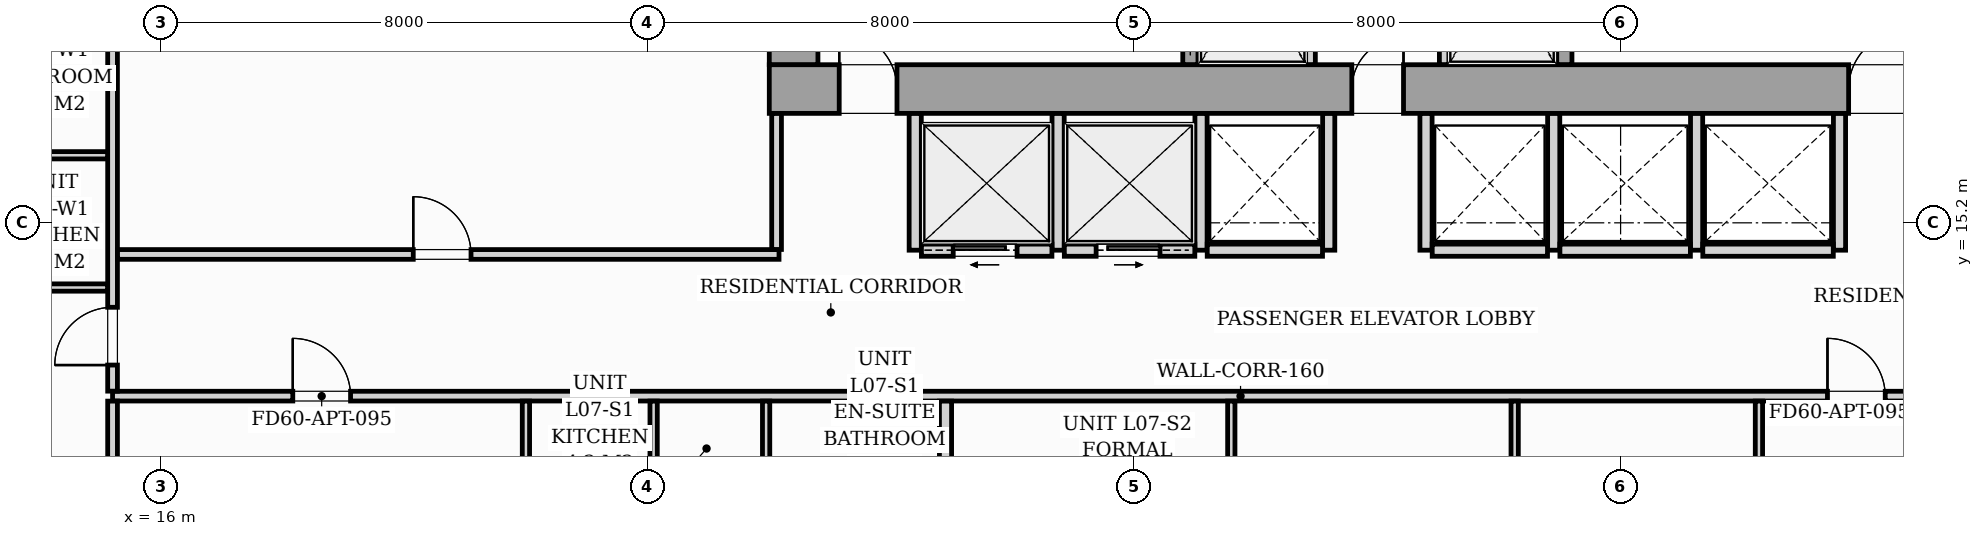
"""IFC4 building model, lengths in metres.
Left out: names, types, materials, properties, quantities, classifications, styles, units other than length and angle.
Written with IfcOpenShell. Run it as: python <this file> out.ifc"""

import sys

from ifc_helpers import new_model, si_unit, direction, frame, frame_2d, origin, origin_2d, place, context, subcontext, project, spatial, rectangle, i_section, extrude, source, transform, mapped, element, fill, save


model = new_model("IFC4")
c1 = context("Model", 3, precision=1e-05, world=origin(), true_north=direction((0.0, 1.0)))
c2 = subcontext(c1, "Body", "Model", "MODEL_VIEW")
j1 = project(units=[si_unit("LENGTHUNIT", "METRE"), si_unit("PLANEANGLEUNIT", "RADIAN")], contexts=[c1])
p1 = place(None, origin())
s1 = spatial("IfcSite", under=j1, at=p1, CompositionType="ELEMENT")
p2 = place(p1, origin())
s2 = spatial("IfcBuilding", under=s1, at=p2, CompositionType="ELEMENT")
p3 = place(p2, frame((0.0, 0.0, 29.4)))
s3 = spatial("IfcBuildingStorey", under=s2, at=p3, CompositionType="ELEMENT", Elevation=29.4)
m1 = source(origin(), c2, "Body", "SweptSolid", [
    extrude(i_section(OverallWidth=0.437, OverallDepth=0.514, WebThickness=0.061, FlangeThickness=0.097, FilletRadius=0.018, at=origin_2d()), origin(), (0.0, 0.0, 1.0), 3.196),
])
for number, where, z_axis, x_axis in (
    (1, (26.4, 17.4, 0.002), (0.0, 0.0, 1.0), (1.0, 0.0, 0.0)),
    (2, (33.12, 17.4, 0.002), (0.0, 0.0, 1.0), (1.0, 0.0, 0.0)),
    (3, (38.88, 17.4, 0.002), (0.0, 0.0, 1.0), (1.0, 0.0, 0.0)),
):
    element("IfcColumn", number, at=place(p3, frame(where, z_axis=z_axis, x_axis=x_axis)), inside=s3, PredefinedType="PILASTER", context=c2, shape_type="MappedRepresentation", body=[
        mapped(m1, transform((0.0, 0.0, 0.0), scale=1.0)),
    ])
p4 = place(p3, frame((26.0, 17.4, 0.0), z_axis=(0.0, 0.0, 1.0), x_axis=(1.0, 0.0, 0.0)))
e4 = element("IfcWall", 4, at=p4, inside=s3, PredefinedType="SHEAR", context=c2, shape_type="SweptSolid", body=[
    extrude(rectangle(XDim=20.0, YDim=0.8, at=frame_2d((10.0, 0.0))), origin(), (0.0, 0.0, 1.0), 3.2),
])
p5 = place(p4, frame((1.15, 0.0, 0.0)))
e5 = element("IfcOpeningElement", 5, at=p5, cuts=e4, PredefinedType="OPENING", context=c2, shape_type="SweptSolid", body=[
    extrude(rectangle(XDim=0.95, YDim=2.06, at=frame_2d((0.475, 1.03))), frame((0.0, 0.41, 0.0), z_axis=(0.0, -1.0, 0.0), x_axis=(1.0, 0.0, 0.0)), (0.0, 0.0, 1.0), 0.82),
])
p6 = place(p4, frame((9.58, 0.0, 0.0)))
e6 = element("IfcOpeningElement", 6, at=p6, cuts=e4, PredefinedType="OPENING", context=c2, shape_type="SweptSolid", body=[
    extrude(rectangle(XDim=0.85, YDim=2.0, at=frame_2d((0.425, 1.0))), frame((0.0, 0.41, 0.0), z_axis=(0.0, -1.0, 0.0), x_axis=(1.0, 0.0, 0.0)), (0.0, 0.0, 1.0), 0.82),
])
p7 = place(p4, frame((17.75, 0.0, 0.0)))
e7 = element("IfcOpeningElement", 7, at=p7, cuts=e4, PredefinedType="OPENING", context=c2, shape_type="SweptSolid", body=[
    extrude(rectangle(XDim=0.95, YDim=2.06, at=frame_2d((0.475, 1.03))), frame((0.0, 0.41, 0.0), z_axis=(0.0, -1.0, 0.0), x_axis=(1.0, 0.0, 0.0)), (0.0, 0.0, 1.0), 0.82),
])
p8 = place(p3, frame((26.4, 17.802, 0.0), z_axis=(0.0, 0.0, 1.0), x_axis=(0.0, 1.0, 0.0)))
e8 = element("IfcWall", 8, at=p8, inside=s3, PredefinedType="SHEAR", context=c2, shape_type="SweptSolid", body=[
    extrude(rectangle(XDim=5.796, YDim=0.8, at=frame_2d((2.898, 0.0))), origin(), (0.0, 0.0, 1.0), 3.2),
])
p9 = place(p3, frame((32.925, 17.802, 0.0), z_axis=(0.0, 0.0, 1.0), x_axis=(0.0, 1.0, 0.0)))
e9 = element("IfcWall", 9, at=p9, inside=s3, PredefinedType="SOLIDWALL", context=c2, shape_type="SweptSolid", body=[
    extrude(rectangle(XDim=2.646, YDim=0.25, at=frame_2d((1.323, 0.0))), origin(), (0.0, 0.0, 1.0), 3.2),
])
p10 = place(p9, frame((0.648, 0.0, 0.0)))
e10 = element("IfcOpeningElement", 10, at=p10, cuts=e9, PredefinedType="OPENING", context=c2, shape_type="SweptSolid", body=[
    extrude(rectangle(XDim=1.1, YDim=2.08, at=frame_2d((0.55, 1.04))), frame((0.0, 0.135, 0.0), z_axis=(0.0, -1.0, 0.0), x_axis=(1.0, 0.0, 0.0)), (0.0, 0.0, 1.0), 0.27),
])
for number, where, z_axis, x_axis in (
    (11, (34.9, 17.802, 0.0), (0.0, 0.0, 1.0), (0.0, 1.0, 0.0)),
    (12, (37.1, 17.802, 0.0), (0.0, 0.0, 1.0), (0.0, 1.0, 0.0)),
):
    element("IfcWall", number, at=place(p3, frame(where, z_axis=z_axis, x_axis=x_axis)), inside=s3, PredefinedType="PARTITIONING", context=c2, shape_type="SweptSolid", body=[
        extrude(rectangle(XDim=2.646, YDim=0.16, at=frame_2d((1.323, 0.0))), origin(), (0.0, 0.0, 1.0), 2.94),
    ])
p11 = place(p3, frame((39.075, 17.802, 0.0), z_axis=(0.0, 0.0, 1.0), x_axis=(0.0, 1.0, 0.0)))
e13 = element("IfcWall", 13, at=p11, inside=s3, PredefinedType="SOLIDWALL", context=c2, shape_type="SweptSolid", body=[
    extrude(rectangle(XDim=2.646, YDim=0.25, at=frame_2d((1.323, 0.0))), origin(), (0.0, 0.0, 1.0), 3.2),
])
p12 = place(p11, frame((0.648, 0.0, 0.0)))
e14 = element("IfcOpeningElement", 14, at=p12, cuts=e13, PredefinedType="OPENING", context=c2, shape_type="SweptSolid", body=[
    extrude(rectangle(XDim=1.1, YDim=2.08, at=frame_2d((0.55, 1.04))), frame((0.0, 0.135, 0.0), z_axis=(0.0, -1.0, 0.0), x_axis=(1.0, 0.0, 0.0)), (0.0, 0.0, 1.0), 0.27),
])
for number, where, z_axis, x_axis in (
    (15, (28.4, 14.75, 0.0), (0.0, 0.0, 1.0), (0.0, 1.0, 0.0)),
    (16, (30.75, 14.75, 0.0), (0.0, 0.0, 1.0), (0.0, 1.0, 0.0)),
    (17, (33.1, 14.75, 0.0), (0.0, 0.0, 1.0), (0.0, 1.0, 0.0)),
):
    element("IfcWall", number, at=place(p3, frame(where, z_axis=z_axis, x_axis=x_axis)), inside=s3, PredefinedType="PARTITIONING", context=c2, shape_type="SweptSolid", body=[
        extrude(rectangle(XDim=2.248, YDim=0.2, at=frame_2d((1.124, 0.0))), origin(), (0.0, 0.0, 1.0), 2.94),
    ])
p13 = place(p3, frame((28.502, 14.75, 0.0), z_axis=(0.0, 0.0, 1.0), x_axis=(1.0, 0.0, 0.0)))
e18 = element("IfcWall", 18, at=p13, inside=s3, PredefinedType="PARTITIONING", context=c2, shape_type="SweptSolid", body=[
    extrude(rectangle(XDim=2.146, YDim=0.2, at=frame_2d((1.073, 0.0))), origin(), (0.0, 0.0, 1.0), 2.94),
])
p14 = place(p13, frame((0.523, 0.0, 0.0)))
e19 = element("IfcOpeningElement", 19, at=p14, cuts=e18, PredefinedType="OPENING", context=c2, shape_type="SweptSolid", body=[
    extrude(rectangle(XDim=1.05, YDim=2.08, at=frame_2d((0.525, 1.04))), frame((0.0, 0.11, 0.0), z_axis=(0.0, -1.0, 0.0), x_axis=(1.0, 0.0, 0.0)), (0.0, 0.0, 1.0), 0.22),
])
p15 = place(p3, frame((30.852, 14.75, 0.0), z_axis=(0.0, 0.0, 1.0), x_axis=(1.0, 0.0, 0.0)))
e20 = element("IfcWall", 20, at=p15, inside=s3, PredefinedType="PARTITIONING", context=c2, shape_type="SweptSolid", body=[
    extrude(rectangle(XDim=2.146, YDim=0.2, at=frame_2d((1.073, 0.0))), origin(), (0.0, 0.0, 1.0), 2.94),
])
p16 = place(p15, frame((0.523, 0.0, 0.0)))
e21 = element("IfcOpeningElement", 21, at=p16, cuts=e20, PredefinedType="OPENING", context=c2, shape_type="SweptSolid", body=[
    extrude(rectangle(XDim=1.05, YDim=2.08, at=frame_2d((0.525, 1.04))), frame((0.0, 0.11, 0.0), z_axis=(0.0, -1.0, 0.0), x_axis=(1.0, 0.0, 0.0)), (0.0, 0.0, 1.0), 0.22),
])
p17 = place(p3, frame((35.2, 14.75, 0.0), z_axis=(0.0, 0.0, 1.0), x_axis=(0.0, 1.0, 0.0)))
e22 = element("IfcWall", 22, at=p17, inside=s3, PredefinedType="PARTITIONING", context=c2, shape_type="SweptSolid", body=[
    extrude(rectangle(XDim=2.248, YDim=0.2, at=frame_2d((1.124, 0.0))), origin(), (0.0, 0.0, 1.0), 2.94),
])
p18 = place(p3, frame((33.202, 14.75, 0.0), z_axis=(0.0, 0.0, 1.0), x_axis=(1.0, 0.0, 0.0)))
e23 = element("IfcWall", 23, at=p18, inside=s3, PredefinedType="PARTITIONING", context=c2, shape_type="SweptSolid", body=[
    extrude(rectangle(XDim=1.896, YDim=0.2, at=frame_2d((0.948, 0.0))), origin(), (0.0, 0.0, 1.0), 2.94),
])
for number, where, z_axis, x_axis in (
    (24, (36.8, 14.75, 0.0), (0.0, 0.0, 1.0), (0.0, 1.0, 0.0)),
    (25, (38.9, 14.75, 0.0), (0.0, 0.0, 1.0), (0.0, 1.0, 0.0)),
):
    element("IfcWall", number, at=place(p3, frame(where, z_axis=z_axis, x_axis=x_axis)), inside=s3, PredefinedType="PARTITIONING", context=c2, shape_type="SweptSolid", body=[
        extrude(rectangle(XDim=2.248, YDim=0.2, at=frame_2d((1.124, 0.0))), origin(), (0.0, 0.0, 1.0), 2.94),
    ])
p19 = place(p3, frame((36.902, 14.75, 0.0), z_axis=(0.0, 0.0, 1.0), x_axis=(1.0, 0.0, 0.0)))
e26 = element("IfcWall", 26, at=p19, inside=s3, PredefinedType="PARTITIONING", context=c2, shape_type="SweptSolid", body=[
    extrude(rectangle(XDim=1.896, YDim=0.2, at=frame_2d((0.948, 0.0))), origin(), (0.0, 0.0, 1.0), 2.94),
])
for number, where, z_axis, x_axis in (
    (27, (41.25, 14.75, 0.0), (0.0, 0.0, 1.0), (0.0, 1.0, 0.0)),
    (28, (43.6, 14.75, 0.0), (0.0, 0.0, 1.0), (0.0, 1.0, 0.0)),
):
    element("IfcWall", number, at=place(p3, frame(where, z_axis=z_axis, x_axis=x_axis)), inside=s3, PredefinedType="PARTITIONING", context=c2, shape_type="SweptSolid", body=[
        extrude(rectangle(XDim=2.248, YDim=0.2, at=frame_2d((1.124, 0.0))), origin(), (0.0, 0.0, 1.0), 2.94),
    ])
for number, where, z_axis, x_axis in (
    (29, (39.002, 14.75, 0.0), (0.0, 0.0, 1.0), (1.0, 0.0, 0.0)),
    (30, (41.352, 14.75, 0.0), (0.0, 0.0, 1.0), (1.0, 0.0, 0.0)),
):
    element("IfcWall", number, at=place(p3, frame(where, z_axis=z_axis, x_axis=x_axis)), inside=s3, PredefinedType="PARTITIONING", context=c2, shape_type="SweptSolid", body=[
        extrude(rectangle(XDim=2.146, YDim=0.2, at=frame_2d((1.073, 0.0))), origin(), (0.0, 0.0, 1.0), 2.94),
    ])
p20 = place(p3, frame((15.2, 12.35, 0.0), z_axis=(0.0, 0.0, 1.0), x_axis=(1.0, 0.0, 0.0)))
e31 = element("IfcWall", 31, at=p20, inside=s3, PredefinedType="PARTITIONING", context=c2, shape_type="SweptSolid", body=[
    extrude(rectangle(XDim=37.1, YDim=0.16, at=frame_2d((18.55, 0.0))), origin(), (0.0, 0.0, 1.0), 2.94),
])
p21 = place(p20, frame((2.964, 0.0, 0.0)))
e32 = element("IfcOpeningElement", 32, at=p21, cuts=e31, PredefinedType="OPENING", context=c2, shape_type="SweptSolid", body=[
    extrude(rectangle(XDim=0.95, YDim=2.06, at=frame_2d((0.475, 1.03))), frame((0.0, 0.09, 0.0), z_axis=(0.0, -1.0, 0.0), x_axis=(1.0, 0.0, 0.0)), (0.0, 0.0, 1.0), 0.18),
])
p22 = place(p20, frame((28.202, 0.0, 0.0)))
e33 = element("IfcOpeningElement", 33, at=p22, cuts=e31, PredefinedType="OPENING", context=c2, shape_type="SweptSolid", body=[
    extrude(rectangle(XDim=0.95, YDim=2.06, at=frame_2d((0.475, 1.03))), frame((0.0, 0.09, 0.0), z_axis=(0.0, -1.0, 0.0), x_axis=(1.0, 0.0, 0.0)), (0.0, 0.0, 1.0), 0.18),
])
p23 = place(p3, frame((15.2, 2.962, 0.0), z_axis=(0.0, 0.0, 1.0), x_axis=(0.0, 1.0, 0.0)))
e34 = element("IfcWall", 34, at=p23, inside=s3, PredefinedType="PARTITIONING", context=c2, shape_type="SweptSolid", body=[
    extrude(rectangle(XDim=9.306, YDim=0.16, at=frame_2d((4.653, 0.0))), origin(), (0.0, 0.0, 1.0), 2.94),
])
p24 = place(p3, frame((15.2, 12.432, 0.0), z_axis=(0.0, 0.0, 1.0), x_axis=(0.0, 1.0, 0.0)))
e35 = element("IfcWall", 35, at=p24, inside=s3, PredefinedType="PARTITIONING", context=c2, shape_type="SweptSolid", body=[
    extrude(rectangle(XDim=15.006, YDim=0.16, at=frame_2d((7.503, 0.0))), origin(), (0.0, 0.0, 1.0), 2.94),
])
p25 = place(p24, frame((0.429, 0.0, 0.0)))
e36 = element("IfcOpeningElement", 36, at=p25, cuts=e35, PredefinedType="OPENING", context=c2, shape_type="SweptSolid", body=[
    extrude(rectangle(XDim=0.95, YDim=2.06, at=frame_2d((0.475, 1.03))), frame((0.0, 0.09, 0.0), z_axis=(0.0, -1.0, 0.0), x_axis=(1.0, 0.0, 0.0)), (0.0, 0.0, 1.0), 0.18),
])
p26 = place(p3, frame((25.948, 2.78, 0.0), z_axis=(0.0, 0.0, 1.0), x_axis=(0.0, 1.0, 0.0)))
e37 = element("IfcWall", 37, at=p26, inside=s3, PredefinedType="PARTITIONING", context=c2, shape_type="SweptSolid", body=[
    extrude(rectangle(XDim=9.488, YDim=0.12, at=frame_2d((4.744, 0.0))), origin(), (0.0, 0.0, 1.0), 2.94),
])
p27 = place(p26, frame((6.22, 0.0, 0.0)))
e38 = element("IfcOpeningElement", 38, at=p27, cuts=e37, PredefinedType="OPENING", context=c2, shape_type="SweptSolid", body=[
    extrude(rectangle(XDim=0.9, YDim=2.05, at=frame_2d((0.45, 1.025))), frame((0.0, 0.07, 0.0), z_axis=(0.0, -1.0, 0.0), x_axis=(1.0, 0.0, 0.0)), (0.0, 0.0, 1.0), 0.14),
])
for number, where, z_axis, x_axis in (
    (39, (24.098, 10.162, 0.0), (0.0, 0.0, 1.0), (0.0, 1.0, 0.0)),
    (40, (21.998, 10.162, 0.0), (0.0, 0.0, 1.0), (0.0, 1.0, 0.0)),
):
    element("IfcWall", number, at=place(p3, frame(where, z_axis=z_axis, x_axis=x_axis)), inside=s3, PredefinedType="PARTITIONING", context=c2, shape_type="SweptSolid", body=[
        extrude(rectangle(XDim=2.106, YDim=0.12, at=frame_2d((1.053, 0.0))), origin(), (0.0, 0.0, 1.0), 2.94),
    ])
p28 = place(p3, frame((28.898, 10.112, 0.0), z_axis=(0.0, 0.0, 1.0), x_axis=(0.0, 1.0, 0.0)))
e41 = element("IfcWall", 41, at=p28, inside=s3, PredefinedType="PARTITIONING", context=c2, shape_type="SweptSolid", body=[
    extrude(rectangle(XDim=2.156, YDim=0.2, at=frame_2d((1.078, 0.0))), origin(), (0.0, 0.0, 1.0), 2.94),
])
p29 = place(p3, frame((33.598, 2.78, 0.0), z_axis=(0.0, 0.0, 1.0), x_axis=(0.0, 1.0, 0.0)))
e42 = element("IfcWall", 42, at=p29, inside=s3, PredefinedType="PARTITIONING", context=c2, shape_type="SweptSolid", body=[
    extrude(rectangle(XDim=9.488, YDim=0.12, at=frame_2d((4.744, 0.0))), origin(), (0.0, 0.0, 1.0), 2.94),
])
p30 = place(p29, frame((4.4, 0.0, 0.0)))
e43 = element("IfcOpeningElement", 43, at=p30, cuts=e42, PredefinedType="OPENING", context=c2, shape_type="SweptSolid", body=[
    extrude(rectangle(XDim=0.85, YDim=2.05, at=frame_2d((0.425, 1.025))), frame((0.0, 0.07, 0.0), z_axis=(0.0, -1.0, 0.0), x_axis=(1.0, 0.0, 0.0)), (0.0, 0.0, 1.0), 0.14),
])
p31 = place(p3, frame((38.258, 2.78, 0.0), z_axis=(0.0, 0.0, 1.0), x_axis=(0.0, 1.0, 0.0)))
e44 = element("IfcWall", 44, at=p31, inside=s3, PredefinedType="PARTITIONING", context=c2, shape_type="SweptSolid", body=[
    extrude(rectangle(XDim=9.488, YDim=0.12, at=frame_2d((4.744, 0.0))), origin(), (0.0, 0.0, 1.0), 2.94),
])
p32 = place(p31, frame((4.4, 0.0, 0.0)))
e45 = element("IfcOpeningElement", 45, at=p32, cuts=e44, PredefinedType="OPENING", context=c2, shape_type="SweptSolid", body=[
    extrude(rectangle(XDim=0.85, YDim=2.05, at=frame_2d((0.425, 1.025))), frame((0.0, 0.07, 0.0), z_axis=(0.0, -1.0, 0.0), x_axis=(1.0, 0.0, 0.0)), (0.0, 0.0, 1.0), 0.14),
])
p33 = place(p3, frame((42.275, 2.962, 0.0), z_axis=(0.0, 0.0, 1.0), x_axis=(0.0, 1.0, 0.0)))
e46 = element("IfcWall", 46, at=p33, inside=s3, PredefinedType="PARTITIONING", context=c2, shape_type="SweptSolid", body=[
    extrude(rectangle(XDim=9.306, YDim=0.12, at=frame_2d((4.653, 0.0))), origin(), (0.0, 0.0, 1.0), 2.94),
])
p34 = place(p33, frame((4.218, 0.0, 0.0)))
e47 = element("IfcOpeningElement", 47, at=p34, cuts=e46, PredefinedType="OPENING", context=c2, shape_type="SweptSolid", body=[
    extrude(rectangle(XDim=0.85, YDim=2.05, at=frame_2d((0.425, 1.025))), frame((0.0, 0.07, 0.0), z_axis=(0.0, -1.0, 0.0), x_axis=(1.0, 0.0, 0.0)), (0.0, 0.0, 1.0), 0.14),
])
p35 = place(p3, frame((12.862, 16.311, 0.0), z_axis=(0.0, 0.0, 1.0), x_axis=(1.0, 0.0, 0.0)))
e48 = element("IfcWall", 48, at=p35, inside=s3, PredefinedType="PARTITIONING", context=c2, shape_type="SweptSolid", body=[
    extrude(rectangle(XDim=2.256, YDim=0.12, at=frame_2d((1.128, 0.0))), origin(), (0.0, 0.0, 1.0), 2.045),
])
p36 = place(p3, frame((12.862, 14.136, 0.0), z_axis=(0.0, 0.0, 1.0), x_axis=(1.0, 0.0, 0.0)))
e49 = element("IfcWall", 49, at=p36, inside=s3, PredefinedType="PARTITIONING", context=c2, shape_type="SweptSolid", body=[
    extrude(rectangle(XDim=2.256, YDim=0.12, at=frame_2d((1.128, 0.0))), origin(), (0.0, 0.0, 1.0), 2.94),
])
p37 = place(p3, frame((15.282, 14.68, 0.0), z_axis=(0.0, 0.0, 1.0), x_axis=(1.0, 0.0, 0.0)))
e50 = element("IfcWall", 50, at=p37, inside=s3, PredefinedType="PARTITIONING", context=c2, shape_type="SweptSolid", body=[
    extrude(rectangle(XDim=10.878, YDim=0.16, at=frame_2d((5.439, 0.0))), origin(), (0.0, 0.0, 1.0), 2.94),
])
p38 = place(p37, frame((4.863, 0.0, 0.0)))
e51 = element("IfcOpeningElement", 51, at=p38, cuts=e50, PredefinedType="OPENING", context=c2, shape_type="SweptSolid", body=[
    extrude(rectangle(XDim=0.95, YDim=2.06, at=frame_2d((0.475, 1.03))), frame((0.0, 0.09, 0.0), z_axis=(0.0, -1.0, 0.0), x_axis=(1.0, 0.0, 0.0)), (0.0, 0.0, 1.0), 0.18),
])
p39 = place(p3, frame((26.12, 14.762, 0.0), z_axis=(0.0, 0.0, 1.0), x_axis=(0.0, 1.0, 0.0)))
e52 = element("IfcWall", 52, at=p39, inside=s3, PredefinedType="PARTITIONING", context=c2, shape_type="SweptSolid", body=[
    extrude(rectangle(XDim=2.236, YDim=0.16, at=frame_2d((1.118, 0.0))), origin(), (0.0, 0.0, 1.0), 2.94),
])
m2 = source(origin(), c2, "Body", "SweptSolid", [
    extrude(rectangle(XDim=0.95, YDim=2.06, at=frame_2d((0.475, 1.03))), frame((0.0, 0.025, 0.0), z_axis=(0.0, -1.0, 0.0), x_axis=(1.0, 0.0, 0.0)), (0.0, 0.0, 1.0), 0.05),
])
p40 = place(p5, origin())
e53 = element("IfcDoor", 53, at=p40, inside=s3, OperationType="SINGLE_SWING_LEFT", PredefinedType="DOOR", context=c2, shape_type="MappedRepresentation", body=[
    mapped(m2, transform((0.0, 0.0, 0.0), scale=1.0)),
])
fill(e5, e53)
m3 = source(origin(), c2, "Body", "SweptSolid", [
    extrude(rectangle(XDim=0.85, YDim=2.0, at=frame_2d((0.425, 1.0))), frame((0.0, 0.025, 0.0), z_axis=(0.0, -1.0, 0.0), x_axis=(1.0, 0.0, 0.0)), (0.0, 0.0, 1.0), 0.05),
])
p41 = place(p6, origin())
e54 = element("IfcDoor", 54, at=p41, inside=s3, OperationType="SINGLE_SWING_RIGHT", PredefinedType="DOOR", context=c2, shape_type="MappedRepresentation", body=[
    mapped(m3, transform((0.0, 0.0, 0.0), scale=1.0)),
])
fill(e6, e54)
p42 = place(p7, origin())
e55 = element("IfcDoor", 55, at=p42, inside=s3, OperationType="SINGLE_SWING_RIGHT", PredefinedType="DOOR", context=c2, shape_type="MappedRepresentation", body=[
    mapped(m2, transform((0.0, 0.0, 0.0), scale=1.0)),
])
fill(e7, e55)
m4 = source(origin(), c2, "Body", "SweptSolid", [
    extrude(rectangle(XDim=1.05, YDim=2.08, at=frame_2d((0.525, 1.04))), frame((0.0, 0.025, 0.0), z_axis=(0.0, -1.0, 0.0), x_axis=(1.0, 0.0, 0.0)), (0.0, 0.0, 1.0), 0.05),
])
p43 = place(p14, origin())
e56 = element("IfcDoor", 56, at=p43, inside=s3, OperationType="SLIDING_TO_LEFT", PredefinedType="DOOR", context=c2, shape_type="MappedRepresentation", body=[
    mapped(m4, transform((0.0, 0.0, 0.0), scale=1.0)),
])
fill(e19, e56)
p44 = place(p16, origin())
e57 = element("IfcDoor", 57, at=p44, inside=s3, OperationType="SLIDING_TO_RIGHT", PredefinedType="DOOR", context=c2, shape_type="MappedRepresentation", body=[
    mapped(m4, transform((0.0, 0.0, 0.0), scale=1.0)),
])
fill(e21, e57)
m5 = source(origin(), c2, "Body", "SweptSolid", [
    extrude(rectangle(XDim=0.95, YDim=2.06, at=frame_2d((0.475, 1.03))), frame((0.0, 0.025, 0.0), z_axis=(0.0, -1.0, 0.0), x_axis=(1.0, 0.0, 0.0)), (0.0, 0.0, 1.0), 0.05),
])
p45 = place(p21, origin())
e58 = element("IfcDoor", 58, at=p45, inside=s3, OperationType="SINGLE_SWING_LEFT", PredefinedType="DOOR", context=c2, shape_type="MappedRepresentation", body=[
    mapped(m5, transform((0.0, 0.0, 0.0), scale=1.0)),
])
fill(e32, e58)
p46 = place(p22, origin())
e59 = element("IfcDoor", 59, at=p46, inside=s3, OperationType="SINGLE_SWING_LEFT", PredefinedType="DOOR", context=c2, shape_type="MappedRepresentation", body=[
    mapped(m5, transform((0.0, 0.0, 0.0), scale=1.0)),
])
fill(e33, e59)
p47 = place(p25, origin())
e60 = element("IfcDoor", 60, at=p47, inside=s3, OperationType="SINGLE_SWING_LEFT", PredefinedType="DOOR", context=c2, shape_type="MappedRepresentation", body=[
    mapped(m5, transform((0.0, 0.0, 0.0), scale=1.0)),
])
fill(e36, e60)
p48 = place(p38, origin())
e61 = element("IfcDoor", 61, at=p48, inside=s3, OperationType="SINGLE_SWING_LEFT", PredefinedType="DOOR", context=c2, shape_type="MappedRepresentation", body=[
    mapped(m5, transform((0.0, 0.0, 0.0), scale=1.0)),
])
fill(e51, e61)
save(model, sys.argv[1])
